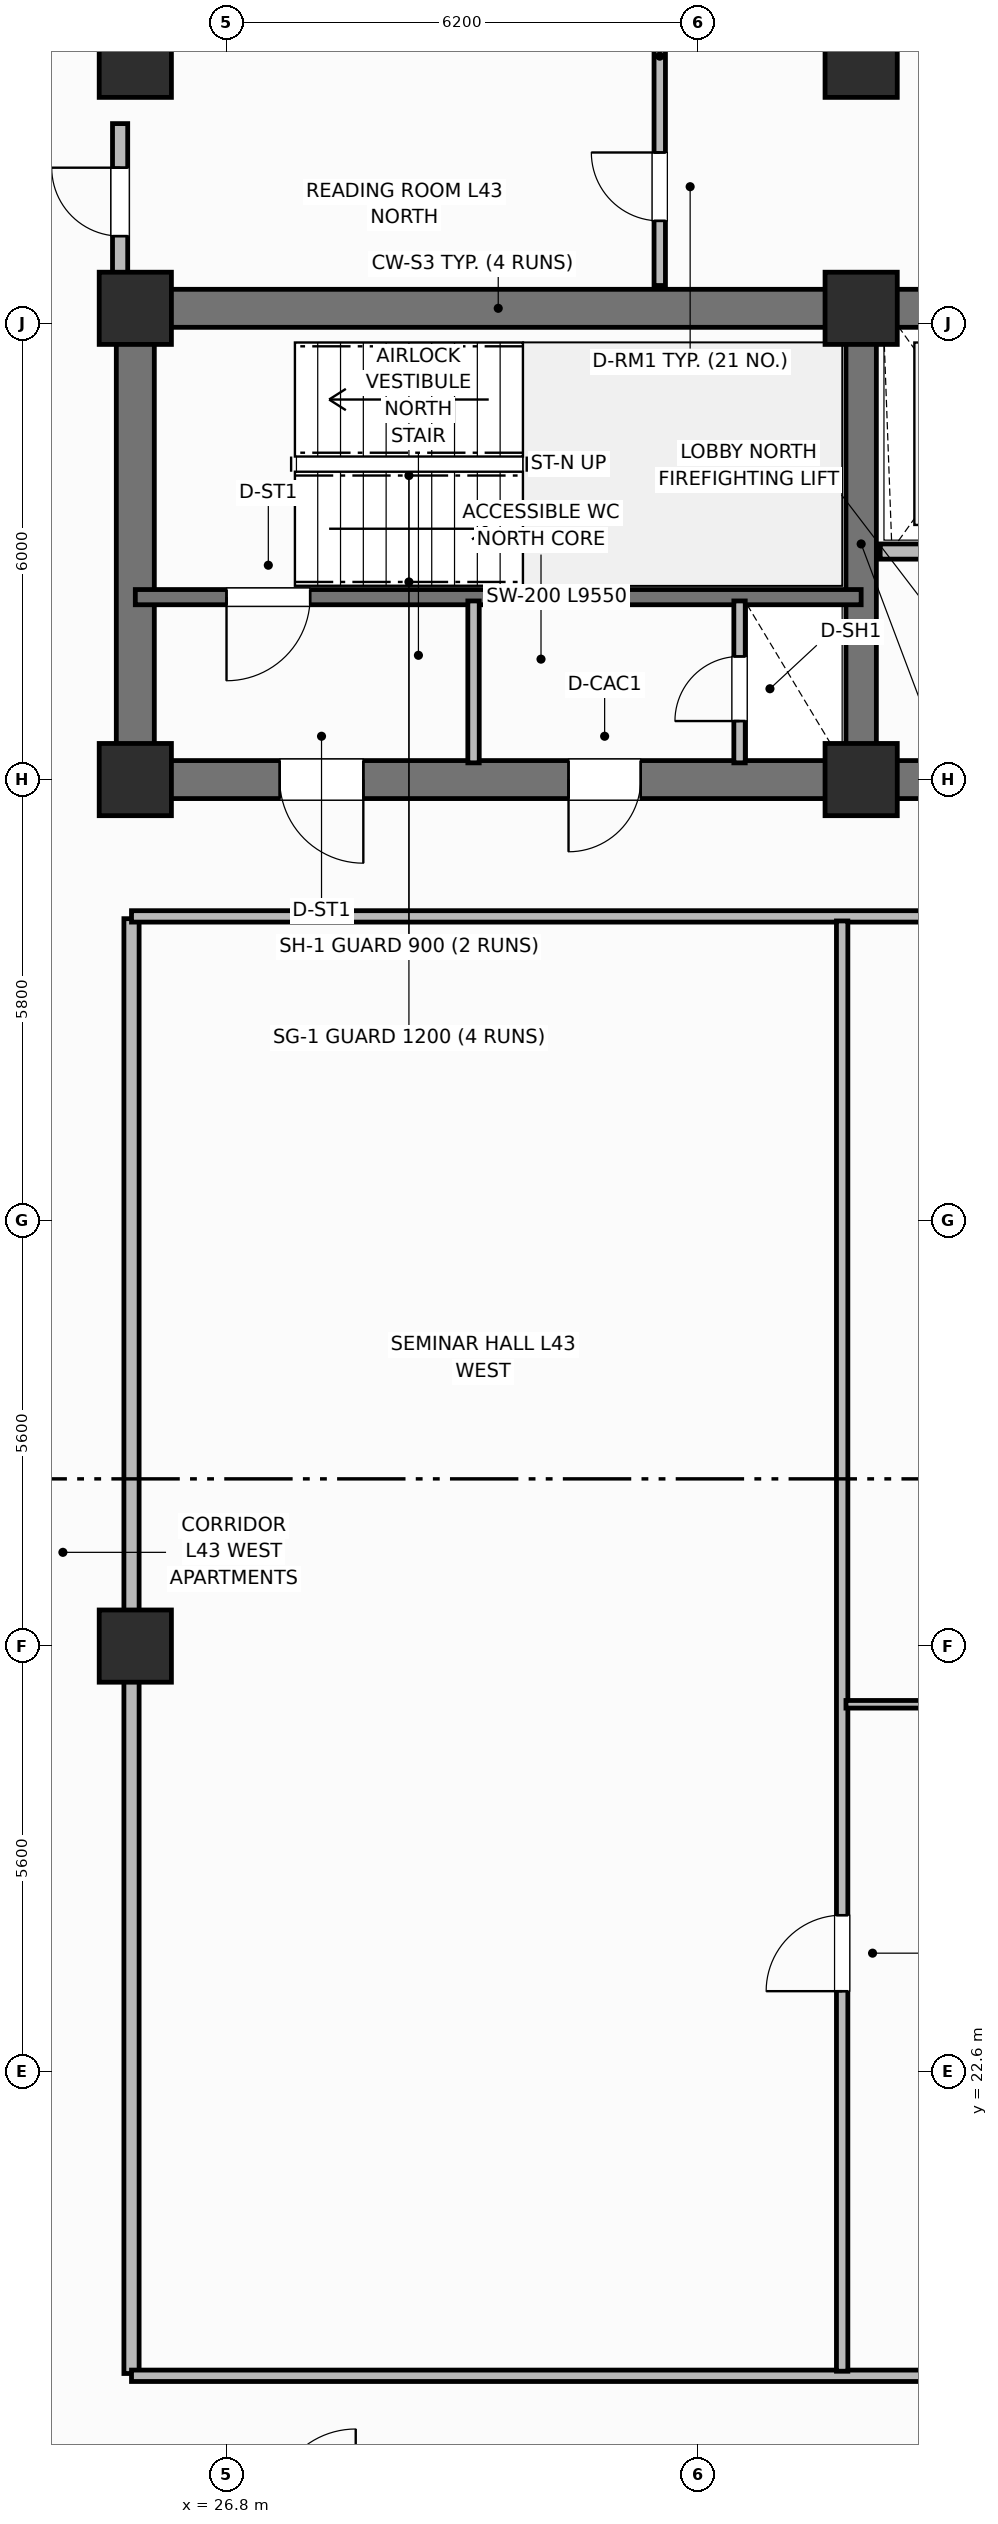
"""IFC4 building model, lengths in metres.
Left out: names, types, materials, properties, quantities, classifications, styles, units other than length and angle.
Written with IfcOpenShell. Run it as: python <this file> out.ifc"""

import sys

from ifc_helpers import new_model, si_unit, direction, frame, frame_2d, origin, origin_2d, place, context, subcontext, project, spatial, rectangle, extrude, element, fill, save


model = new_model("IFC4")
c1 = context("Model", 3, precision=1e-05, world=origin(), true_north=direction((0.0, 1.0)))
c2 = subcontext(c1, "Body", "Model", "MODEL_VIEW")
j1 = project(units=[si_unit("LENGTHUNIT", "METRE"), si_unit("PLANEANGLEUNIT", "RADIAN")], contexts=[c1])
p1 = place(None, origin())
s1 = spatial("IfcSite", under=j1, at=p1, CompositionType="ELEMENT")
p2 = place(p1, origin())
s2 = spatial("IfcBuilding", under=s1, at=p2, CompositionType="ELEMENT")
p3 = place(p2, frame((0.0, 0.0, 173.7)))
s3 = spatial("IfcBuildingStorey", under=s2, at=p3, CompositionType="ELEMENT", Elevation=173.7)
p4 = place(p3, frame((25.6, 45.8, 0.0), z_axis=(0.0, 0.0, 1.0), x_axis=(1.0, 0.0, 0.0)))
e1 = element("IfcWall", 1, at=p4, inside=s3, PredefinedType="SHEAR", context=c2, shape_type="SweptSolid", body=[
    extrude(rectangle(XDim=27.2, YDim=0.5, at=frame_2d((13.6, 0.0))), origin(), (0.0, 0.0, 1.0), 3.7),
])
p5 = place(p3, frame((25.6, 39.85, 0.0), z_axis=(0.0, 0.0, 1.0), x_axis=(0.0, 1.0, 0.0)))
e2 = element("IfcWall", 2, at=p5, inside=s3, PredefinedType="SHEAR", context=c2, shape_type="SweptSolid", body=[
    extrude(rectangle(XDim=5.7, YDim=0.5, at=frame_2d((2.85, 0.0))), origin(), (0.0, 0.0, 1.0), 3.7),
])
p6 = place(p3, frame((52.8, 39.6, 0.0), z_axis=(0.0, 0.0, 1.0), x_axis=(-1.0, 0.0, 0.0)))
e3 = element("IfcWall", 3, at=p6, inside=s3, PredefinedType="SHEAR", context=c2, shape_type="SweptSolid", body=[
    extrude(rectangle(XDim=27.2, YDim=0.5, at=frame_2d((13.6, 0.0))), origin(), (0.0, 0.0, 1.0), 3.7),
])
p7 = place(p6, frame((24.2, 0.0, 0.0)))
e4 = element("IfcOpeningElement", 4, at=p7, cuts=e3, PredefinedType="OPENING", context=c2, shape_type="SweptSolid", body=[
    extrude(rectangle(XDim=1.1, YDim=2.15, at=frame_2d((0.55, 1.075))), frame((0.0, 0.26, 0.0), z_axis=(0.0, -1.0, 0.0), x_axis=(1.0, 0.0, 0.0)), (0.0, 0.0, 1.0), 0.52),
])
p8 = place(p6, frame((20.55, 0.0, 0.0)))
e5 = element("IfcOpeningElement", 5, at=p8, cuts=e3, PredefinedType="OPENING", context=c2, shape_type="SweptSolid", body=[
    extrude(rectangle(XDim=0.95, YDim=2.1, at=frame_2d((0.475, 1.05))), frame((0.0, 0.26, 0.0), z_axis=(0.0, -1.0, 0.0), x_axis=(1.0, 0.0, 0.0)), (0.0, 0.0, 1.0), 0.52),
])
p9 = place(p6, frame((15.1, 0.0, 0.0)))
e6 = element("IfcOpeningElement", 6, at=p9, cuts=e3, PredefinedType="OPENING", context=c2, shape_type="SweptSolid", body=[
    extrude(rectangle(XDim=1.2, YDim=2.15, at=frame_2d((0.6, 1.075))), frame((0.0, 0.26, 0.0), z_axis=(0.0, -1.0, 0.0), x_axis=(1.0, 0.0, 0.0)), (0.0, 0.0, 1.0), 0.52),
])
p10 = place(p6, frame((13.05, 0.0, 0.0)))
e7 = element("IfcOpeningElement", 7, at=p10, cuts=e3, PredefinedType="OPENING", context=c2, shape_type="SweptSolid", body=[
    extrude(rectangle(XDim=0.85, YDim=2.1, at=frame_2d((0.425, 1.05))), frame((0.0, 0.26, 0.0), z_axis=(0.0, -1.0, 0.0), x_axis=(1.0, 0.0, 0.0)), (0.0, 0.0, 1.0), 0.52),
])
p11 = place(p6, frame((11.0, 0.0, 0.0)))
e8 = element("IfcOpeningElement", 8, at=p11, cuts=e3, PredefinedType="OPENING", context=c2, shape_type="SweptSolid", body=[
    extrude(rectangle(XDim=0.85, YDim=2.1, at=frame_2d((0.425, 1.05))), frame((0.0, 0.26, 0.0), z_axis=(0.0, -1.0, 0.0), x_axis=(1.0, 0.0, 0.0)), (0.0, 0.0, 1.0), 0.52),
])
p12 = place(p6, frame((7.35, 0.0, 0.0)))
e9 = element("IfcOpeningElement", 9, at=p12, cuts=e3, PredefinedType="OPENING", context=c2, shape_type="SweptSolid", body=[
    extrude(rectangle(XDim=0.85, YDim=2.1, at=frame_2d((0.425, 1.05))), frame((0.0, 0.26, 0.0), z_axis=(0.0, -1.0, 0.0), x_axis=(1.0, 0.0, 0.0)), (0.0, 0.0, 1.0), 0.52),
])
p13 = place(p6, frame((4.8, 0.0, 0.0)))
e10 = element("IfcOpeningElement", 10, at=p13, cuts=e3, PredefinedType="OPENING", context=c2, shape_type="SweptSolid", body=[
    extrude(rectangle(XDim=0.85, YDim=2.1, at=frame_2d((0.425, 1.05))), frame((0.0, 0.26, 0.0), z_axis=(0.0, -1.0, 0.0), x_axis=(1.0, 0.0, 0.0)), (0.0, 0.0, 1.0), 0.52),
])
p14 = place(p6, frame((1.9, 0.0, 0.0)))
e11 = element("IfcOpeningElement", 11, at=p14, cuts=e3, PredefinedType="OPENING", context=c2, shape_type="SweptSolid", body=[
    extrude(rectangle(XDim=0.85, YDim=2.1, at=frame_2d((0.425, 1.05))), frame((0.0, 0.26, 0.0), z_axis=(0.0, -1.0, 0.0), x_axis=(1.0, 0.0, 0.0)), (0.0, 0.0, 1.0), 0.52),
])
p15 = place(p3, frame((35.15, 39.85, 0.0), z_axis=(0.0, 0.0, 1.0), x_axis=(0.0, 1.0, 0.0)))
e12 = element("IfcWall", 12, at=p15, inside=s3, PredefinedType="SHEAR", context=c2, shape_type="SweptSolid", body=[
    extrude(rectangle(XDim=5.7, YDim=0.4, at=frame_2d((2.85, 0.0))), origin(), (0.0, 0.0, 1.0), 3.7),
])
for number, where, z_axis, x_axis in (
    (13, (25.6, 39.6, 0.0), (0.0, 0.0, 1.0), (1.0, 0.0, 0.0)),
    (14, (25.6, 45.8, 0.0), (0.0, 0.0, 1.0), (1.0, 0.0, 0.0)),
    (15, (35.15, 39.6, 0.0), (0.0, 0.0, 1.0), (1.0, 0.0, 0.0)),
    (16, (35.15, 45.8, 0.0), (0.0, 0.0, 1.0), (1.0, 0.0, 0.0)),
    (17, (25.6, 28.2, 0.0), (0.0, 0.0, 1.0), (1.0, 0.0, 0.0)),
    (18, (25.6, 49.05, 0.0), (0.0, 0.0, 1.0), (1.0, 0.0, 0.0)),
    (19, (35.15, 49.05, 0.0), (0.0, 0.0, 1.0), (1.0, 0.0, 0.0)),
):
    element("IfcColumn", number, at=place(p3, frame(where, z_axis=z_axis, x_axis=x_axis)), inside=s3, PredefinedType="COLUMN", context=c2, shape_type="SweptSolid", body=[
        extrude(rectangle(XDim=0.95, YDim=0.95, at=origin_2d()), origin(), (0.0, 0.0, 1.0), 3.7),
    ])
p16 = place(p3, frame((35.15, 42.0, 0.0), z_axis=(0.0, 0.0, 1.0), x_axis=(-1.0, 0.0, 0.0)))
e20 = element("IfcWall", 20, at=p16, inside=s3, PredefinedType="SHEAR", context=c2, shape_type="SweptSolid", body=[
    extrude(rectangle(XDim=9.55, YDim=0.2, at=frame_2d((4.775, 0.0))), origin(), (0.0, 0.0, 1.0), 3.7),
])
p17 = place(p16, frame((7.25, 0.0, 0.0)))
e21 = element("IfcOpeningElement", 21, at=p17, cuts=e20, PredefinedType="OPENING", context=c2, shape_type="SweptSolid", body=[
    extrude(rectangle(XDim=1.1, YDim=2.15, at=frame_2d((0.55, 1.075))), frame((0.0, 0.11, 0.0), z_axis=(0.0, -1.0, 0.0), x_axis=(1.0, 0.0, 0.0)), (0.0, 0.0, 1.0), 0.22),
])
p18 = place(p3, frame((33.55, 39.82, 0.0), z_axis=(0.0, 0.0, 1.0), x_axis=(0.0, 1.0, 0.0)))
e22 = element("IfcWall", 22, at=p18, inside=s3, PredefinedType="PARTITIONING", context=c2, shape_type="SweptSolid", body=[
    extrude(rectangle(XDim=2.13, YDim=0.15, at=frame_2d((1.065, 0.0))), origin(), (0.0, 0.0, 1.0), 2.55),
])
p19 = place(p18, frame((0.55, 0.0, 0.0)))
e23 = element("IfcOpeningElement", 23, at=p19, cuts=e22, PredefinedType="OPENING", context=c2, shape_type="SweptSolid", body=[
    extrude(rectangle(XDim=0.85, YDim=2.05, at=frame_2d((0.425, 1.025))), frame((0.0, 0.085, 0.0), z_axis=(0.0, -1.0, 0.0), x_axis=(1.0, 0.0, 0.0)), (0.0, 0.0, 1.0), 0.17),
])
p20 = place(p3, frame((30.05, 39.82, 0.0), z_axis=(0.0, 0.0, 1.0), x_axis=(0.0, 1.0, 0.0)))
e24 = element("IfcWall", 24, at=p20, inside=s3, PredefinedType="PARTITIONING", context=c2, shape_type="SweptSolid", body=[
    extrude(rectangle(XDim=2.13, YDim=0.15, at=frame_2d((1.065, 0.0))), origin(), (0.0, 0.0, 1.0), 2.55),
])
p21 = place(p3, frame((37.95, 42.6, 0.0), z_axis=(0.0, 0.0, 1.0), x_axis=(-1.0, 0.0, 0.0)))
e25 = element("IfcWall", 25, at=p21, inside=s3, PredefinedType="PARTITIONING", context=c2, shape_type="SweptSolid", body=[
    extrude(rectangle(XDim=2.55, YDim=0.2, at=frame_2d((1.275, 0.0))), origin(), (0.0, 0.0, 1.0), 2.32),
])
p22 = place(p21, frame((0.75, 0.0, 0.0)))
e26 = element("IfcOpeningElement", 26, at=p22, cuts=e25, PredefinedType="OPENING", context=c2, shape_type="SweptSolid", body=[
    extrude(rectangle(XDim=1.1, YDim=2.15, at=frame_2d((0.55, 1.075))), frame((0.0, 0.11, 0.0), z_axis=(0.0, -1.0, 0.0), x_axis=(1.0, 0.0, 0.0)), (0.0, 0.0, 1.0), 0.22),
])
p23 = place(p3, frame((25.55, 18.63, 0.0), z_axis=(0.0, 0.0, 1.0), x_axis=(0.0, 1.0, 0.0)))
e27 = element("IfcWall", 27, at=p23, inside=s3, PredefinedType="PARTITIONING", context=c2, shape_type="SweptSolid", body=[
    extrude(rectangle(XDim=19.14, YDim=0.2, at=frame_2d((9.57, 0.0))), origin(), (0.0, 0.0, 1.0), 2.55),
])
for number, where, z_axis, x_axis in (
    (28, (25.55, 18.6, 0.0), (0.0, 0.0, 1.0), (1.0, 0.0, 0.0)),
    (29, (25.55, 37.8, 0.0), (0.0, 0.0, 1.0), (1.0, 0.0, 0.0)),
):
    element("IfcWall", number, at=place(p3, frame(where, z_axis=z_axis, x_axis=x_axis)), inside=s3, PredefinedType="PARTITIONING", context=c2, shape_type="SweptSolid", body=[
        extrude(rectangle(XDim=22.2, YDim=0.15, at=frame_2d((11.1, 0.0))), origin(), (0.0, 0.0, 1.0), 2.55),
    ])
p24 = place(p3, frame((34.9, 18.66, 0.0), z_axis=(0.0, 0.0, 1.0), x_axis=(0.0, 1.0, 0.0)))
e30 = element("IfcWall", 30, at=p24, inside=s3, PredefinedType="PARTITIONING", context=c2, shape_type="SweptSolid", body=[
    extrude(rectangle(XDim=19.08, YDim=0.15, at=frame_2d((9.54, 0.0))), origin(), (0.0, 0.0, 1.0), 2.55),
])
p25 = place(p24, frame((5.0, 0.0, 0.0)))
e31 = element("IfcOpeningElement", 31, at=p25, cuts=e30, PredefinedType="OPENING", context=c2, shape_type="SweptSolid", body=[
    extrude(rectangle(XDim=1.0, YDim=2.15, at=frame_2d((0.5, 1.075))), frame((0.0, 0.085, 0.0), z_axis=(0.0, -1.0, 0.0), x_axis=(1.0, 0.0, 0.0)), (0.0, 0.0, 1.0), 0.17),
])
p26 = place(p3, frame((34.95, 27.434, 0.0), z_axis=(0.0, 0.0, 1.0), x_axis=(1.0, 0.0, 0.0)))
e32 = element("IfcWall", 32, at=p26, inside=s3, PredefinedType="PARTITIONING", context=c2, shape_type="SweptSolid", body=[
    extrude(rectangle(XDim=12.81, YDim=0.1, at=frame_2d((6.405, 0.0))), origin(), (0.0, 0.0, 1.0), 2.55),
])
p27 = place(p3, frame((32.5, 46.1, 0.0), z_axis=(0.0, 0.0, 1.0), x_axis=(0.0, 1.0, 0.0)))
e33 = element("IfcWall", 33, at=p27, inside=s3, PredefinedType="PARTITIONING", context=c2, shape_type="SweptSolid", body=[
    extrude(rectangle(XDim=3.43, YDim=0.15, at=frame_2d((1.715, 0.0))), origin(), (0.0, 0.0, 1.0), 2.55),
])
p28 = place(p27, frame((0.85, 0.0, 0.0)))
e34 = element("IfcOpeningElement", 34, at=p28, cuts=e33, PredefinedType="OPENING", context=c2, shape_type="SweptSolid", body=[
    extrude(rectangle(XDim=0.9, YDim=2.1, at=frame_2d((0.45, 1.05))), frame((0.0, 0.085, 0.0), z_axis=(0.0, -1.0, 0.0), x_axis=(1.0, 0.0, 0.0)), (0.0, 0.0, 1.0), 0.17),
])
p29 = place(p3, frame((25.4, 46.1, 0.0), z_axis=(0.0, 0.0, 1.0), x_axis=(0.0, 1.0, 0.0)))
e35 = element("IfcWall", 35, at=p29, inside=s3, PredefinedType="PARTITIONING", context=c2, shape_type="SweptSolid", body=[
    extrude(rectangle(XDim=2.13, YDim=0.2, at=frame_2d((1.065, 0.0))), origin(), (0.0, 0.0, 1.0), 2.55),
])
p30 = place(p29, frame((0.65, 0.0, 0.0)))
e36 = element("IfcOpeningElement", 36, at=p30, cuts=e35, PredefinedType="OPENING", context=c2, shape_type="SweptSolid", body=[
    extrude(rectangle(XDim=0.9, YDim=2.1, at=frame_2d((0.45, 1.05))), frame((0.0, 0.11, 0.0), z_axis=(0.0, -1.0, 0.0), x_axis=(1.0, 0.0, 0.0)), (0.0, 0.0, 1.0), 0.22),
])
p31 = place(p17, origin())
e37 = element("IfcDoor", 37, at=p31, inside=s3, OperationType="SINGLE_SWING_RIGHT", PredefinedType="DOOR", context=c2, shape_type="SweptSolid", body=[
    extrude(rectangle(XDim=1.1, YDim=2.15, at=frame_2d((0.55, 1.075))), frame((0.0, 0.025, 0.0), z_axis=(0.0, -1.0, 0.0), x_axis=(1.0, 0.0, 0.0)), (0.0, 0.0, 1.0), 0.05),
])
fill(e21, e37)
p32 = place(p19, origin())
e38 = element("IfcDoor", 38, at=p32, inside=s3, OperationType="SINGLE_SWING_LEFT", PredefinedType="TRAPDOOR", context=c2, shape_type="SweptSolid", body=[
    extrude(rectangle(XDim=0.85, YDim=2.05, at=frame_2d((0.425, 1.025))), frame((0.0, 0.025, 0.0), z_axis=(0.0, -1.0, 0.0), x_axis=(1.0, 0.0, 0.0)), (0.0, 0.0, 1.0), 0.05),
])
fill(e23, e38)
p33 = place(p25, origin())
e39 = element("IfcDoor", 39, at=p33, inside=s3, OperationType="SINGLE_SWING_LEFT", PredefinedType="DOOR", context=c2, shape_type="SweptSolid", body=[
    extrude(rectangle(XDim=1.0, YDim=2.15, at=frame_2d((0.5, 1.075))), frame((0.0, 0.025, 0.0), z_axis=(0.0, -1.0, 0.0), x_axis=(1.0, 0.0, 0.0)), (0.0, 0.0, 1.0), 0.05),
])
fill(e31, e39)
p34 = place(p28, origin())
e40 = element("IfcDoor", 40, at=p34, inside=s3, OperationType="SINGLE_SWING_RIGHT", PredefinedType="DOOR", context=c2, shape_type="SweptSolid", body=[
    extrude(rectangle(XDim=0.9, YDim=2.1, at=frame_2d((0.45, 1.05))), frame((0.0, 0.025, 0.0), z_axis=(0.0, -1.0, 0.0), x_axis=(1.0, 0.0, 0.0)), (0.0, 0.0, 1.0), 0.05),
])
fill(e34, e40)
p35 = place(p30, origin())
e41 = element("IfcDoor", 41, at=p35, inside=s3, OperationType="SINGLE_SWING_RIGHT", PredefinedType="DOOR", context=c2, shape_type="SweptSolid", body=[
    extrude(rectangle(XDim=0.9, YDim=2.1, at=frame_2d((0.45, 1.05))), frame((0.0, 0.025, 0.0), z_axis=(0.0, -1.0, 0.0), x_axis=(1.0, 0.0, 0.0)), (0.0, 0.0, 1.0), 0.05),
])
fill(e36, e41)
p36 = place(p7, origin())
e42 = element("IfcDoor", 42, at=p36, inside=s3, OperationType="SINGLE_SWING_LEFT", PredefinedType="DOOR", context=c2, shape_type="SweptSolid", body=[
    extrude(rectangle(XDim=1.1, YDim=2.15, at=frame_2d((0.55, 1.075))), frame((0.0, 0.025, 0.0), z_axis=(0.0, -1.0, 0.0), x_axis=(1.0, 0.0, 0.0)), (0.0, 0.0, 1.0), 0.05),
])
fill(e4, e42)
p37 = place(p8, origin())
e43 = element("IfcDoor", 43, at=p37, inside=s3, OperationType="SINGLE_SWING_RIGHT", PredefinedType="DOOR", context=c2, shape_type="SweptSolid", body=[
    extrude(rectangle(XDim=0.95, YDim=2.1, at=frame_2d((0.475, 1.05))), frame((0.0, 0.025, 0.0), z_axis=(0.0, -1.0, 0.0), x_axis=(1.0, 0.0, 0.0)), (0.0, 0.0, 1.0), 0.05),
])
fill(e5, e43)
save(model, sys.argv[1])
